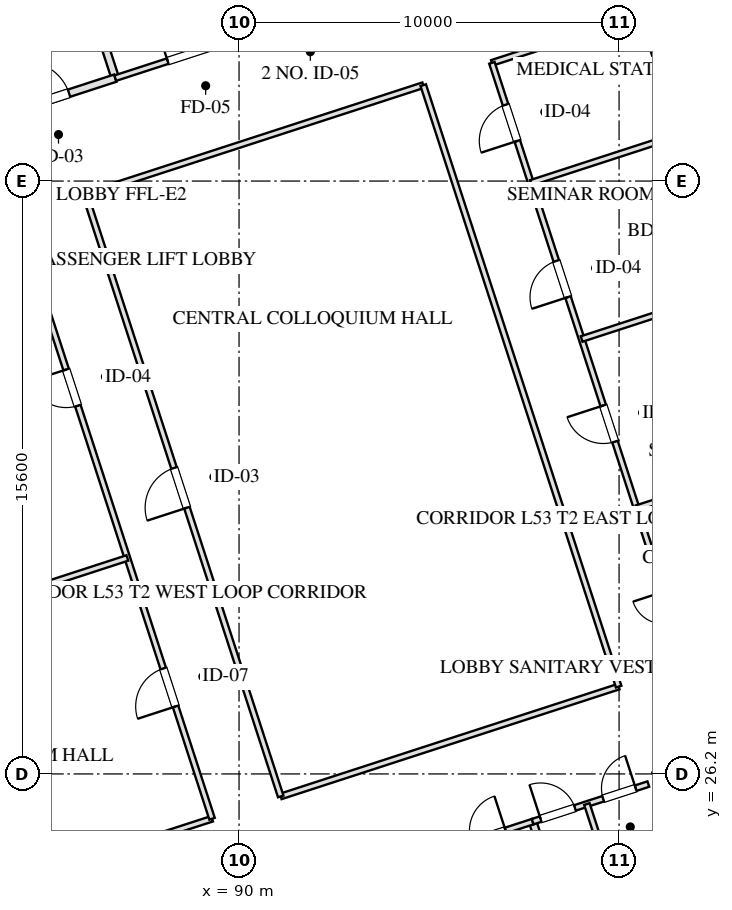
"""IFC4 building model, lengths in metres.
Left out: names, types, materials, properties, quantities, classifications, styles, units other than length and angle.
Written with IfcOpenShell. Run it as: python <this file> out.ifc"""

import sys

from ifc_helpers import new_model, si_unit, direction, frame, frame_2d, origin, place, context, subcontext, project, spatial, rectangle, extrude, element, fill, save


model = new_model("IFC4")
c1 = context("Model", 3, precision=1e-05, world=origin(), true_north=direction((0.0, 1.0)))
c2 = subcontext(c1, "Body", "Model", "MODEL_VIEW")
j1 = project(units=[si_unit("LENGTHUNIT", "METRE"), si_unit("PLANEANGLEUNIT", "RADIAN")], contexts=[c1])
p1 = place(None, origin())
s1 = spatial("IfcSite", under=j1, at=p1, CompositionType="ELEMENT")
p2 = place(p1, origin())
s2 = spatial("IfcBuilding", under=s1, at=p2, CompositionType="ELEMENT")
p3 = place(p2, frame((0.0, 0.0, 198.95)))
s3 = spatial("IfcBuildingStorey", under=s2, at=p3, CompositionType="ELEMENT", Elevation=198.95)
p4 = place(p3, frame((97.382, 56.586, 0.0), z_axis=(0.0, 0.0, 1.0), x_axis=(0.309016491071, -0.951056679828, 0.0)))
e1 = element("IfcWall", 1, at=p4, inside=s3, PredefinedType="SOLIDWALL", context=c2, shape_type="SweptSolid", body=[
    extrude(rectangle(XDim=38.4, YDim=0.4, at=frame_2d((19.2, 0.0))), origin(), (0.0, 0.0, 1.0), 2.61),
])
p5 = place(p4, frame((24.55, 0.0, 0.75)))
e2 = element("IfcOpeningElement", 2, at=p5, cuts=e1, PredefinedType="OPENING", context=c2, shape_type="SweptSolid", body=[
    extrude(rectangle(XDim=2.1, YDim=1.46, at=frame_2d((1.05, 0.73))), frame((0.0, 0.21, 0.0), z_axis=(0.0, -1.0, 0.0), x_axis=(1.0, 0.0, 0.0)), (0.0, 0.0, 1.0), 0.42),
])
p6 = place(p4, frame((20.75, 0.0, 0.75)))
e3 = element("IfcOpeningElement", 3, at=p6, cuts=e1, PredefinedType="OPENING", context=c2, shape_type="SweptSolid", body=[
    extrude(rectangle(XDim=2.1, YDim=1.46, at=frame_2d((1.05, 0.73))), frame((0.0, 0.21, 0.0), z_axis=(0.0, -1.0, 0.0), x_axis=(1.0, 0.0, 0.0)), (0.0, 0.0, 1.0), 0.42),
])
p7 = place(p4, frame((16.05, 0.0, 0.0)))
e4 = element("IfcOpeningElement", 4, at=p7, cuts=e1, PredefinedType="OPENING", context=c2, shape_type="SweptSolid", body=[
    extrude(rectangle(XDim=1.1, YDim=2.15, at=frame_2d((0.55, 1.075))), frame((0.0, 0.21, 0.0), z_axis=(0.0, -1.0, 0.0), x_axis=(1.0, 0.0, 0.0)), (0.0, 0.0, 1.0), 0.42),
])
p8 = place(p3, frame((97.727, 24.944, 0.0), z_axis=(0.0, 0.0, 1.0), x_axis=(0.309016001439, -0.951056838919, 0.0)))
e5 = element("IfcWall", 5, at=p8, inside=s3, PredefinedType="PARTITIONING", context=c2, shape_type="SweptSolid", body=[
    extrude(rectangle(XDim=8.43, YDim=0.2, at=frame_2d((4.215, 0.0))), origin(), (0.0, 0.0, 1.0), 3.175),
])
p9 = place(p3, frame((93.542, 23.585, 0.0), z_axis=(0.0, 0.0, 1.0), x_axis=(0.951063829732, 0.308994485023, 0.0)))
e6 = element("IfcWall", 6, at=p9, inside=s3, PredefinedType="PARTITIONING", context=c2, shape_type="SweptSolid", body=[
    extrude(rectangle(XDim=4.4, YDim=0.15, at=frame_2d((2.2, 0.0))), origin(), (0.0, 0.0, 1.0), 3.175),
])
p10 = place(p9, frame((0.55, 0.0, 0.0)))
e7 = element("IfcOpeningElement", 7, at=p10, cuts=e6, PredefinedType="OPENING", context=c2, shape_type="SweptSolid", body=[
    extrude(rectangle(XDim=0.95, YDim=2.05, at=frame_2d((0.475, 1.025))), frame((0.0, 0.085, 0.0), z_axis=(0.0, -1.0, 0.0), x_axis=(1.0, 0.0, 0.0)), (0.0, 0.0, 1.0), 0.17),
])
p11 = place(p9, frame((2.7, 0.0, 0.0)))
e8 = element("IfcOpeningElement", 8, at=p11, cuts=e6, PredefinedType="OPENING", context=c2, shape_type="SweptSolid", body=[
    extrude(rectangle(XDim=0.95, YDim=2.05, at=frame_2d((0.475, 1.025))), frame((0.0, 0.085, 0.0), z_axis=(0.0, -1.0, 0.0), x_axis=(1.0, 0.0, 0.0)), (0.0, 0.0, 1.0), 0.17),
])
p12 = place(p3, frame((97.727, 24.944, 0.0), z_axis=(0.0, 0.0, 1.0), x_axis=(0.951036872128, 0.309077446369, 0.0)))
e9 = element("IfcWall", 9, at=p12, inside=s3, PredefinedType="PARTITIONING", context=c2, shape_type="SweptSolid", body=[
    extrude(rectangle(XDim=3.2, YDim=0.15, at=frame_2d((1.6, 0.0))), origin(), (0.0, 0.0, 1.0), 3.175),
])
p13 = place(p12, frame((0.22, 0.0, 0.0)))
e10 = element("IfcOpeningElement", 10, at=p13, cuts=e9, PredefinedType="OPENING", context=c2, shape_type="SweptSolid", body=[
    extrude(rectangle(XDim=0.95, YDim=2.05, at=frame_2d((0.475, 1.025))), frame((0.0, 0.085, 0.0), z_axis=(0.0, -1.0, 0.0), x_axis=(1.0, 0.0, 0.0)), (0.0, 0.0, 1.0), 0.17),
])
p14 = place(p12, frame((1.95, 0.0, 0.0)))
e11 = element("IfcOpeningElement", 11, at=p14, cuts=e9, PredefinedType="OPENING", context=c2, shape_type="SweptSolid", body=[
    extrude(rectangle(XDim=0.9, YDim=2.05, at=frame_2d((0.45, 1.025))), frame((0.0, 0.085, 0.0), z_axis=(0.0, -1.0, 0.0), x_axis=(1.0, 0.0, 0.0)), (0.0, 0.0, 1.0), 0.17),
])
p15 = place(p3, frame((99.153, 25.408, 0.0), z_axis=(0.0, 0.0, 1.0), x_axis=(0.309016001439, -0.951056838919, 0.0)))
e12 = element("IfcWall", 12, at=p15, inside=s3, PredefinedType="PARTITIONING", context=c2, shape_type="SweptSolid", body=[
    extrude(rectangle(XDim=8.43, YDim=0.15, at=frame_2d((4.215, 0.0))), origin(), (0.0, 0.0, 1.0), 3.175),
])
p16 = place(p15, frame((2.55, 0.0, 0.0)))
e13 = element("IfcOpeningElement", 13, at=p16, cuts=e12, PredefinedType="OPENING", context=c2, shape_type="SweptSolid", body=[
    extrude(rectangle(XDim=0.95, YDim=2.05, at=frame_2d((0.475, 1.025))), frame((0.0, 0.085, 0.0), z_axis=(0.0, -1.0, 0.0), x_axis=(1.0, 0.0, 0.0)), (0.0, 0.0, 1.0), 0.17),
])
p17 = place(p15, frame((5.6, 0.0, 0.0)))
e14 = element("IfcOpeningElement", 14, at=p17, cuts=e12, PredefinedType="OPENING", context=c2, shape_type="SweptSolid", body=[
    extrude(rectangle(XDim=0.9, YDim=2.05, at=frame_2d((0.45, 1.025))), frame((0.0, 0.085, 0.0), z_axis=(0.0, -1.0, 0.0), x_axis=(1.0, 0.0, 0.0)), (0.0, 0.0, 1.0), 0.17),
])
p18 = place(p3, frame((86.743, 44.508, 0.0), z_axis=(0.0, 0.0, 1.0), x_axis=(-0.309016001439, 0.951056838919, 0.0)))
e15 = element("IfcWall", 15, at=p18, inside=s3, PredefinedType="PARTITIONING", context=c2, shape_type="SweptSolid", body=[
    extrude(rectangle(XDim=8.43, YDim=0.2, at=frame_2d((4.215, 0.0))), origin(), (0.0, 0.0, 1.0), 3.175),
])
p19 = place(p3, frame((83.101, 43.324, 0.0), z_axis=(0.0, 0.0, 1.0), x_axis=(0.951052804469, 0.309028417967, 0.0)))
e16 = element("IfcWall", 16, at=p19, inside=s3, PredefinedType="PARTITIONING", context=c2, shape_type="SweptSolid", body=[
    extrude(rectangle(XDim=3.83, YDim=0.2, at=frame_2d((1.915, 0.0))), origin(), (0.0, 0.0, 1.0), 3.175),
])
p20 = place(p19, frame((1.35, 0.0, 0.0)))
e17 = element("IfcOpeningElement", 17, at=p20, cuts=e16, PredefinedType="OPENING", context=c2, shape_type="SweptSolid", body=[
    extrude(rectangle(XDim=1.2, YDim=2.05, at=frame_2d((0.6, 1.025))), frame((0.0, 0.11, 0.0), z_axis=(0.0, -1.0, 0.0), x_axis=(1.0, 0.0, 0.0)), (0.0, 0.0, 1.0), 0.22),
])
p21 = place(p3, frame((86.743, 44.508, 0.0), z_axis=(0.0, 0.0, 1.0), x_axis=(0.951063829732, 0.308994485023, 0.0)))
e18 = element("IfcWall", 18, at=p21, inside=s3, PredefinedType="PARTITIONING", context=c2, shape_type="SweptSolid", body=[
    extrude(rectangle(XDim=4.4, YDim=0.15, at=frame_2d((2.2, 0.0))), origin(), (0.0, 0.0, 1.0), 3.175),
])
p22 = place(p21, frame((1.45, 0.0, 0.0)))
e19 = element("IfcOpeningElement", 19, at=p22, cuts=e18, PredefinedType="OPENING", context=c2, shape_type="SweptSolid", body=[
    extrude(rectangle(XDim=1.5, YDim=2.05, at=frame_2d((0.75, 1.025))), frame((0.0, 0.085, 0.0), z_axis=(0.0, -1.0, 0.0), x_axis=(1.0, 0.0, 0.0)), (0.0, 0.0, 1.0), 0.17),
])
p23 = place(p3, frame((79.447, 21.823, 0.0), z_axis=(0.0, 0.0, 1.0), x_axis=(0.951057294912, 0.309014598029, 0.0)))
e20 = element("IfcWall", 20, at=p23, inside=s3, PredefinedType="PARTITIONING", context=c2, shape_type="SweptSolid", body=[
    extrude(rectangle(XDim=10.35, YDim=0.15, at=frame_2d((5.175, 0.0))), origin(), (0.0, 0.0, 1.0), 3.175),
])
for number, where, z_axis, x_axis in (
    (21, (91.097, 25.608, 0.0), (0.0, 0.0, 1.0), (0.951, 0.309, 0.0)),
    (22, (85.955, 41.434, 0.0), (0.0, 0.0, 1.0), (0.951, 0.309, 0.0)),
):
    element("IfcWall", number, at=place(p3, frame(where, z_axis=z_axis, x_axis=x_axis)), inside=s3, PredefinedType="PARTITIONING", context=c2, shape_type="SweptSolid", body=[
        extrude(rectangle(XDim=9.35, YDim=0.15, at=frame_2d((4.675, 0.0))), origin(), (0.0, 0.0, 1.0), 3.175),
    ])
p24 = place(p3, frame((96.654, 44.91, 0.0), z_axis=(0.0, 0.0, 1.0), x_axis=(0.951044133184, 0.309055103076, 0.0)))
e23 = element("IfcWall", 23, at=p24, inside=s3, PredefinedType="PARTITIONING", context=c2, shape_type="SweptSolid", body=[
    extrude(rectangle(XDim=4.1, YDim=0.15, at=frame_2d((2.05, 0.0))), origin(), (0.0, 0.0, 1.0), 3.175),
])
p25 = place(p3, frame((89.29, 25.021, 0.0), z_axis=(0.0, 0.0, 1.0), x_axis=(-0.309004459387, 0.951060589068, 0.0)))
e24 = element("IfcWall", 24, at=p25, inside=s3, PredefinedType="PARTITIONING", context=c2, shape_type="SweptSolid", body=[
    extrude(rectangle(XDim=16.64, YDim=0.15, at=frame_2d((8.32, 0.0))), origin(), (0.0, 0.0, 1.0), 3.175),
])
p26 = place(p25, frame((3.107, 0.0, 0.0)))
e25 = element("IfcOpeningElement", 25, at=p26, cuts=e24, PredefinedType="OPENING", context=c2, shape_type="SweptSolid", body=[
    extrude(rectangle(XDim=1.05, YDim=2.05, at=frame_2d((0.525, 1.025))), frame((0.0, 0.085, 0.0), z_axis=(0.0, -1.0, 0.0), x_axis=(1.0, 0.0, 0.0)), (0.0, 0.0, 1.0), 0.17),
])
p27 = place(p25, frame((11.427, 0.0, 0.0)))
e26 = element("IfcOpeningElement", 26, at=p27, cuts=e24, PredefinedType="OPENING", context=c2, shape_type="SweptSolid", body=[
    extrude(rectangle(XDim=1.0, YDim=2.05, at=frame_2d((0.5, 1.025))), frame((0.0, 0.085, 0.0), z_axis=(0.0, -1.0, 0.0), x_axis=(1.0, 0.0, 0.0)), (0.0, 0.0, 1.0), 0.17),
])
p28 = place(p3, frame((91.097, 25.608, 0.0), z_axis=(0.0, 0.0, 1.0), x_axis=(-0.30901773025, 0.951056277195, 0.0)))
e27 = element("IfcWall", 27, at=p28, inside=s3, PredefinedType="PARTITIONING", context=c2, shape_type="SweptSolid", body=[
    extrude(rectangle(XDim=16.64, YDim=0.15, at=frame_2d((8.32, 0.0))), origin(), (0.0, 0.0, 1.0), 3.175),
])
p29 = place(p28, frame((7.987, 0.0, 0.0)))
e28 = element("IfcOpeningElement", 28, at=p29, cuts=e27, PredefinedType="OPENING", context=c2, shape_type="SweptSolid", body=[
    extrude(rectangle(XDim=1.1, YDim=2.05, at=frame_2d((0.55, 1.025))), frame((0.0, 0.085, 0.0), z_axis=(0.0, -1.0, 0.0), x_axis=(1.0, 0.0, 0.0)), (0.0, 0.0, 1.0), 0.17),
])
p30 = place(p3, frame((99.989, 28.498, 0.0), z_axis=(0.0, 0.0, 1.0), x_axis=(-0.30901773025, 0.951056277195, 0.0)))
e29 = element("IfcWall", 29, at=p30, inside=s3, PredefinedType="PARTITIONING", context=c2, shape_type="SweptSolid", body=[
    extrude(rectangle(XDim=16.64, YDim=0.15, at=frame_2d((8.32, 0.0))), origin(), (0.0, 0.0, 1.0), 3.175),
])
p31 = place(p3, frame((101.796, 29.085, 0.0), z_axis=(0.0, 0.0, 1.0), x_axis=(-0.309022042254, 0.951054876125, 0.0)))
e30 = element("IfcWall", 30, at=p31, inside=s3, PredefinedType="PARTITIONING", context=c2, shape_type="SweptSolid", body=[
    extrude(rectangle(XDim=16.64, YDim=0.15, at=frame_2d((8.32, 0.0))), origin(), (0.0, 0.0, 1.0), 3.175),
])
p32 = place(p31, frame((1.16, 0.0, 0.0)))
e31 = element("IfcOpeningElement", 31, at=p32, cuts=e30, PredefinedType="OPENING", context=c2, shape_type="SweptSolid", body=[
    extrude(rectangle(XDim=0.85, YDim=2.05, at=frame_2d((0.425, 1.025))), frame((0.0, 0.085, 0.0), z_axis=(0.0, -1.0, 0.0), x_axis=(1.0, 0.0, 0.0)), (0.0, 0.0, 1.0), 0.17),
])
p33 = place(p31, frame((6.16, 0.0, 0.0)))
e32 = element("IfcOpeningElement", 32, at=p33, cuts=e30, PredefinedType="OPENING", context=c2, shape_type="SweptSolid", body=[
    extrude(rectangle(XDim=1.0, YDim=2.05, at=frame_2d((0.5, 1.025))), frame((0.0, 0.085, 0.0), z_axis=(0.0, -1.0, 0.0), x_axis=(1.0, 0.0, 0.0)), (0.0, 0.0, 1.0), 0.17),
])
p34 = place(p31, frame((10.16, 0.0, 0.0)))
e33 = element("IfcOpeningElement", 33, at=p34, cuts=e30, PredefinedType="OPENING", context=c2, shape_type="SweptSolid", body=[
    extrude(rectangle(XDim=1.0, YDim=2.05, at=frame_2d((0.5, 1.025))), frame((0.0, 0.085, 0.0), z_axis=(0.0, -1.0, 0.0), x_axis=(1.0, 0.0, 0.0)), (0.0, 0.0, 1.0), 0.17),
])
p35 = place(p31, frame((14.48, 0.0, 0.0)))
e34 = element("IfcOpeningElement", 34, at=p35, cuts=e30, PredefinedType="OPENING", context=c2, shape_type="SweptSolid", body=[
    extrude(rectangle(XDim=1.0, YDim=2.05, at=frame_2d((0.5, 1.025))), frame((0.0, 0.085, 0.0), z_axis=(0.0, -1.0, 0.0), x_axis=(1.0, 0.0, 0.0)), (0.0, 0.0, 1.0), 0.17),
])
p36 = place(p3, frame((77.217, 28.684, 0.0), z_axis=(0.0, 0.0, 1.0), x_axis=(0.951059547341, 0.309007665621, 0.0)))
e35 = element("IfcWall", 35, at=p36, inside=s3, PredefinedType="PARTITIONING", context=c2, shape_type="SweptSolid", body=[
    extrude(rectangle(XDim=10.35, YDim=0.15, at=frame_2d((5.175, 0.0))), origin(), (0.0, 0.0, 1.0), 3.175),
])
p37 = place(p3, frame((100.461, 33.193, 0.0), z_axis=(0.0, 0.0, 1.0), x_axis=(0.951061634685, 0.309001241148, 0.0)))
e36 = element("IfcWall", 36, at=p37, inside=s3, PredefinedType="PARTITIONING", context=c2, shape_type="SweptSolid", body=[
    extrude(rectangle(XDim=4.1, YDim=0.15, at=frame_2d((2.05, 0.0))), origin(), (0.0, 0.0, 1.0), 3.175),
])
for number, where, z_axis, x_axis in (
    (37, (99.015, 37.644, 0.0), (0.0, 0.0, 1.0), (0.951, 0.309, 0.0)),
    (38, (97.68, 41.753, 0.0), (0.0, 0.0, 1.0), (0.951, 0.309, 0.0)),
):
    element("IfcWall", number, at=place(p3, frame(where, z_axis=z_axis, x_axis=x_axis)), inside=s3, PredefinedType="PARTITIONING", context=c2, shape_type="SweptSolid", body=[
        extrude(rectangle(XDim=4.1, YDim=0.15, at=frame_2d((2.05, 0.0))), origin(), (0.0, 0.0, 1.0), 3.175),
    ])
p38 = place(p11, origin())
e39 = element("IfcDoor", 39, at=p38, inside=s3, OperationType="SINGLE_SWING_RIGHT", PredefinedType="DOOR", context=c2, shape_type="SweptSolid", body=[
    extrude(rectangle(XDim=0.95, YDim=2.05, at=frame_2d((0.475, 1.025))), frame((0.0, 0.025, 0.0), z_axis=(0.0, -1.0, 0.0), x_axis=(1.0, 0.0, 0.0)), (0.0, 0.0, 1.0), 0.05),
])
fill(e8, e39)
p39 = place(p13, origin())
e40 = element("IfcDoor", 40, at=p39, inside=s3, OperationType="SINGLE_SWING_LEFT", PredefinedType="DOOR", context=c2, shape_type="SweptSolid", body=[
    extrude(rectangle(XDim=0.95, YDim=2.05, at=frame_2d((0.475, 1.025))), frame((0.0, 0.025, 0.0), z_axis=(0.0, -1.0, 0.0), x_axis=(1.0, 0.0, 0.0)), (0.0, 0.0, 1.0), 0.05),
])
fill(e10, e40)
p40 = place(p14, origin())
e41 = element("IfcDoor", 41, at=p40, inside=s3, OperationType="SINGLE_SWING_RIGHT", PredefinedType="DOOR", context=c2, shape_type="SweptSolid", body=[
    extrude(rectangle(XDim=0.9, YDim=2.05, at=frame_2d((0.45, 1.025))), frame((0.0, 0.025, 0.0), z_axis=(0.0, -1.0, 0.0), x_axis=(1.0, 0.0, 0.0)), (0.0, 0.0, 1.0), 0.05),
])
fill(e11, e41)
p41 = place(p20, origin())
e42 = element("IfcDoor", 42, at=p41, inside=s3, OperationType="SINGLE_SWING_LEFT", PredefinedType="DOOR", context=c2, shape_type="SweptSolid", body=[
    extrude(rectangle(XDim=1.2, YDim=2.05, at=frame_2d((0.6, 1.025))), frame((0.0, 0.025, 0.0), z_axis=(0.0, -1.0, 0.0), x_axis=(1.0, 0.0, 0.0)), (0.0, 0.0, 1.0), 0.05),
])
fill(e17, e42)
p42 = place(p22, origin())
e43 = element("IfcDoor", 43, at=p42, inside=s3, OperationType="SINGLE_SWING_LEFT", PredefinedType="DOOR", context=c2, shape_type="SweptSolid", body=[
    extrude(rectangle(XDim=1.5, YDim=2.05, at=frame_2d((0.75, 1.025))), frame((0.0, 0.025, 0.0), z_axis=(0.0, -1.0, 0.0), x_axis=(1.0, 0.0, 0.0)), (0.0, 0.0, 1.0), 0.05),
])
fill(e19, e43)
p43 = place(p26, origin())
e44 = element("IfcDoor", 44, at=p43, inside=s3, OperationType="SINGLE_SWING_LEFT", PredefinedType="DOOR", context=c2, shape_type="SweptSolid", body=[
    extrude(rectangle(XDim=1.05, YDim=2.05, at=frame_2d((0.525, 1.025))), frame((0.0, 0.025, 0.0), z_axis=(0.0, -1.0, 0.0), x_axis=(1.0, 0.0, 0.0)), (0.0, 0.0, 1.0), 0.05),
])
fill(e25, e44)
p44 = place(p27, origin())
e45 = element("IfcDoor", 45, at=p44, inside=s3, OperationType="SINGLE_SWING_RIGHT", PredefinedType="DOOR", context=c2, shape_type="SweptSolid", body=[
    extrude(rectangle(XDim=1.0, YDim=2.05, at=frame_2d((0.5, 1.025))), frame((0.0, 0.025, 0.0), z_axis=(0.0, -1.0, 0.0), x_axis=(1.0, 0.0, 0.0)), (0.0, 0.0, 1.0), 0.05),
])
fill(e26, e45)
p45 = place(p29, origin())
e46 = element("IfcDoor", 46, at=p45, inside=s3, OperationType="SINGLE_SWING_LEFT", PredefinedType="DOOR", context=c2, shape_type="SweptSolid", body=[
    extrude(rectangle(XDim=1.1, YDim=2.05, at=frame_2d((0.55, 1.025))), frame((0.0, 0.025, 0.0), z_axis=(0.0, -1.0, 0.0), x_axis=(1.0, 0.0, 0.0)), (0.0, 0.0, 1.0), 0.05),
])
fill(e28, e46)
p46 = place(p33, origin())
e47 = element("IfcDoor", 47, at=p46, inside=s3, OperationType="SINGLE_SWING_RIGHT", PredefinedType="DOOR", context=c2, shape_type="SweptSolid", body=[
    extrude(rectangle(XDim=1.0, YDim=2.05, at=frame_2d((0.5, 1.025))), frame((0.0, 0.025, 0.0), z_axis=(0.0, -1.0, 0.0), x_axis=(1.0, 0.0, 0.0)), (0.0, 0.0, 1.0), 0.05),
])
fill(e32, e47)
p47 = place(p34, origin())
e48 = element("IfcDoor", 48, at=p47, inside=s3, OperationType="SINGLE_SWING_LEFT", PredefinedType="DOOR", context=c2, shape_type="SweptSolid", body=[
    extrude(rectangle(XDim=1.0, YDim=2.05, at=frame_2d((0.5, 1.025))), frame((0.0, 0.025, 0.0), z_axis=(0.0, -1.0, 0.0), x_axis=(1.0, 0.0, 0.0)), (0.0, 0.0, 1.0), 0.05),
])
fill(e33, e48)
p48 = place(p35, origin())
e49 = element("IfcDoor", 49, at=p48, inside=s3, OperationType="SINGLE_SWING_LEFT", PredefinedType="DOOR", context=c2, shape_type="SweptSolid", body=[
    extrude(rectangle(XDim=1.0, YDim=2.05, at=frame_2d((0.5, 1.025))), frame((0.0, 0.025, 0.0), z_axis=(0.0, -1.0, 0.0), x_axis=(1.0, 0.0, 0.0)), (0.0, 0.0, 1.0), 0.05),
])
fill(e34, e49)
save(model, sys.argv[1])
